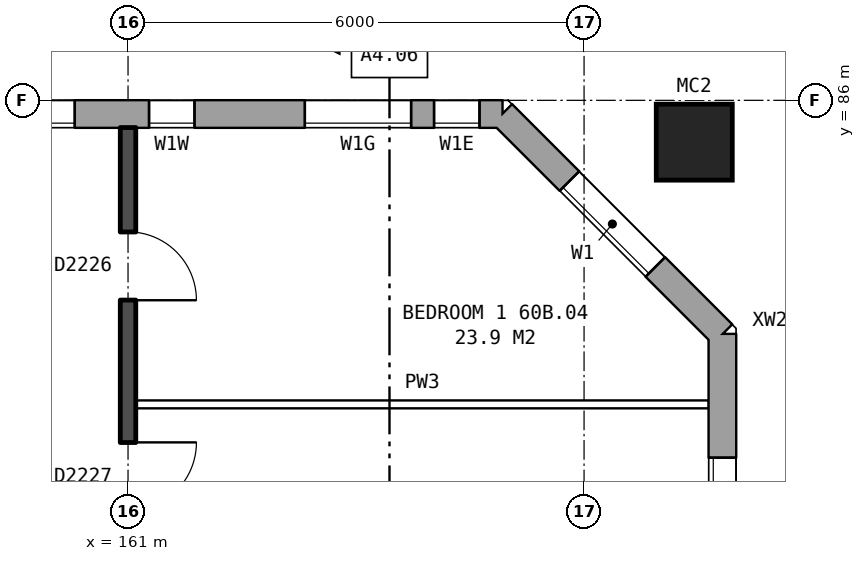
"""IFC4 building model, lengths in metres.
Left out: names, types, materials, properties, quantities, classifications, styles, units other than length and angle.
Written with IfcOpenShell. Run it as: python <this file> out.ifc"""

import sys

from ifc_helpers import new_model, si_unit, direction, frame, frame_2d, origin, origin_2d, place, context, subcontext, project, spatial, rectangle, hollow_rectangle, extrude, element, fill, save


model = new_model("IFC4")
c1 = context("Model", 3, precision=1e-05, world=origin(), true_north=direction((0.0, 1.0)))
c2 = subcontext(c1, "Body", "Model", "MODEL_VIEW")
j1 = project(units=[si_unit("LENGTHUNIT", "METRE"), si_unit("PLANEANGLEUNIT", "RADIAN")], contexts=[c1])
p1 = place(None, origin())
s1 = spatial("IfcSite", under=j1, at=p1, CompositionType="ELEMENT")
p2 = place(p1, origin())
s2 = spatial("IfcBuilding", under=s1, at=p2, CompositionType="ELEMENT")
p3 = place(p2, frame((0.0, 0.0, 212.1)))
s3 = spatial("IfcBuildingStorey", under=s2, at=p3, CompositionType="ELEMENT", Elevation=212.1)
p4 = place(p3, frame((168.45, 85.45, 0.0), z_axis=(0.0, 0.0, 1.0), x_axis=(1.0, 0.0, 0.0)))
e1 = element("IfcColumn", 1, at=p4, inside=s3, PredefinedType="COLUMN", context=c2, shape_type="SweptSolid", body=[
    extrude(hollow_rectangle(XDim=1.0, YDim=1.0, WallThickness=0.055, at=origin_2d()), origin(), (0.0, 0.0, 1.0), 3.1),
])
p5 = place(p3, frame((168.82, 57.075, 0.0), z_axis=(0.0, 0.0, 1.0), x_axis=(0.0, 1.0, 0.0)))
e2 = element("IfcWall", 2, at=p5, inside=s3, PredefinedType="STANDARD", context=c2, shape_type="SweptSolid", body=[
    extrude(rectangle(XDim=25.851, YDim=0.36, at=frame_2d((12.925, 0.0))), origin(), (0.0, 0.0, 1.0), 2.85),
])
p6 = place(p5, frame((1.625, 0.0, 0.8)))
e3 = element("IfcOpeningElement", 3, at=p6, cuts=e2, PredefinedType="OPENING", context=c2, shape_type="SweptSolid", body=[
    extrude(rectangle(XDim=1.6, YDim=1.8, at=frame_2d((0.8, 0.9))), frame((0.0, 0.19, 0.0), z_axis=(0.0, -1.0, 0.0), x_axis=(1.0, 0.0, 0.0)), (0.0, 0.0, 1.0), 0.38),
])
p7 = place(p5, frame((4.625, 0.0, 0.8)))
e4 = element("IfcOpeningElement", 4, at=p7, cuts=e2, PredefinedType="OPENING", context=c2, shape_type="SweptSolid", body=[
    extrude(rectangle(XDim=1.6, YDim=1.8, at=frame_2d((0.8, 0.9))), frame((0.0, 0.19, 0.0), z_axis=(0.0, -1.0, 0.0), x_axis=(1.0, 0.0, 0.0)), (0.0, 0.0, 1.0), 0.38),
])
p8 = place(p5, frame((19.625, 0.0, 0.8)))
e5 = element("IfcOpeningElement", 5, at=p8, cuts=e2, PredefinedType="OPENING", context=c2, shape_type="SweptSolid", body=[
    extrude(rectangle(XDim=1.6, YDim=1.8, at=frame_2d((0.8, 0.9))), frame((0.0, 0.19, 0.0), z_axis=(0.0, -1.0, 0.0), x_axis=(1.0, 0.0, 0.0)), (0.0, 0.0, 1.0), 0.38),
])
p9 = place(p5, frame((22.625, 0.0, 0.8)))
e6 = element("IfcOpeningElement", 6, at=p9, cuts=e2, PredefinedType="OPENING", context=c2, shape_type="SweptSolid", body=[
    extrude(rectangle(XDim=1.6, YDim=1.8, at=frame_2d((0.8, 0.9))), frame((0.0, 0.19, 0.0), z_axis=(0.0, -1.0, 0.0), x_axis=(1.0, 0.0, 0.0)), (0.0, 0.0, 1.0), 0.38),
])
p10 = place(p3, frame((168.82, 82.925, 0.0), z_axis=(0.0, 0.0, 1.0), x_axis=(-0.707106781187, 0.707106781187, 0.0)))
e7 = element("IfcWall", 7, at=p10, inside=s3, PredefinedType="STANDARD", context=c2, shape_type="SweptSolid", body=[
    extrude(rectangle(XDim=4.094, YDim=0.36, at=frame_2d((2.047, 0.0))), origin(), (0.0, 0.0, 1.0), 2.85),
])
p11 = place(p10, frame((1.247, 0.0, 0.8)))
e8 = element("IfcOpeningElement", 8, at=p11, cuts=e7, PredefinedType="OPENING", context=c2, shape_type="SweptSolid", body=[
    extrude(rectangle(XDim=1.6, YDim=1.8, at=frame_2d((0.8, 0.9))), frame((0.0, 0.19, 0.0), z_axis=(0.0, -1.0, 0.0), x_axis=(1.0, 0.0, 0.0)), (0.0, 0.0, 1.0), 0.38),
])
p12 = place(p3, frame((165.925, 85.82, 0.0), z_axis=(0.0, 0.0, 1.0), x_axis=(-1.0, 0.0, 0.0)))
e9 = element("IfcWall", 9, at=p12, inside=s3, PredefinedType="STANDARD", context=c2, shape_type="SweptSolid", body=[
    extrude(rectangle(XDim=33.875, YDim=0.36, at=frame_2d((16.938, 0.0))), origin(), (0.0, 0.0, 1.0), 2.85),
])
p13 = place(p12, frame((0.3, 0.0, 0.8)))
e10 = element("IfcOpeningElement", 10, at=p13, cuts=e9, PredefinedType="OPENING", context=c2, shape_type="SweptSolid", body=[
    extrude(rectangle(XDim=0.6, YDim=1.8, at=frame_2d((0.3, 0.9))), frame((0.0, 0.19, 0.0), z_axis=(0.0, -1.0, 0.0), x_axis=(1.0, 0.0, 0.0)), (0.0, 0.0, 1.0), 0.38),
])
p14 = place(p12, frame((5.625, 0.0, 0.8)))
e11 = element("IfcOpeningElement", 11, at=p14, cuts=e9, PredefinedType="OPENING", context=c2, shape_type="SweptSolid", body=[
    extrude(rectangle(XDim=1.6, YDim=1.8, at=frame_2d((0.8, 0.9))), frame((0.0, 0.19, 0.0), z_axis=(0.0, -1.0, 0.0), x_axis=(1.0, 0.0, 0.0)), (0.0, 0.0, 1.0), 0.38),
])
p15 = place(p12, frame((8.625, 0.0, 0.8)))
e12 = element("IfcOpeningElement", 12, at=p15, cuts=e9, PredefinedType="OPENING", context=c2, shape_type="SweptSolid", body=[
    extrude(rectangle(XDim=1.6, YDim=1.8, at=frame_2d((0.8, 0.9))), frame((0.0, 0.19, 0.0), z_axis=(0.0, -1.0, 0.0), x_axis=(1.0, 0.0, 0.0)), (0.0, 0.0, 1.0), 0.38),
])
p16 = place(p12, frame((11.625, 0.0, 0.8)))
e13 = element("IfcOpeningElement", 13, at=p16, cuts=e9, PredefinedType="OPENING", context=c2, shape_type="SweptSolid", body=[
    extrude(rectangle(XDim=1.6, YDim=1.8, at=frame_2d((0.8, 0.9))), frame((0.0, 0.19, 0.0), z_axis=(0.0, -1.0, 0.0), x_axis=(1.0, 0.0, 0.0)), (0.0, 0.0, 1.0), 0.38),
])
p17 = place(p12, frame((14.625, 0.0, 0.8)))
e14 = element("IfcOpeningElement", 14, at=p17, cuts=e9, PredefinedType="OPENING", context=c2, shape_type="SweptSolid", body=[
    extrude(rectangle(XDim=1.6, YDim=1.8, at=frame_2d((0.8, 0.9))), frame((0.0, 0.19, 0.0), z_axis=(0.0, -1.0, 0.0), x_axis=(1.0, 0.0, 0.0)), (0.0, 0.0, 1.0), 0.38),
])
p18 = place(p12, frame((17.625, 0.0, 0.8)))
e15 = element("IfcOpeningElement", 15, at=p18, cuts=e9, PredefinedType="OPENING", context=c2, shape_type="SweptSolid", body=[
    extrude(rectangle(XDim=1.6, YDim=1.8, at=frame_2d((0.8, 0.9))), frame((0.0, 0.19, 0.0), z_axis=(0.0, -1.0, 0.0), x_axis=(1.0, 0.0, 0.0)), (0.0, 0.0, 1.0), 0.38),
])
p19 = place(p12, frame((20.625, 0.0, 0.8)))
e16 = element("IfcOpeningElement", 16, at=p19, cuts=e9, PredefinedType="OPENING", context=c2, shape_type="SweptSolid", body=[
    extrude(rectangle(XDim=1.6, YDim=1.8, at=frame_2d((0.8, 0.9))), frame((0.0, 0.19, 0.0), z_axis=(0.0, -1.0, 0.0), x_axis=(1.0, 0.0, 0.0)), (0.0, 0.0, 1.0), 0.38),
])
p20 = place(p12, frame((23.625, 0.0, 0.8)))
e17 = element("IfcOpeningElement", 17, at=p20, cuts=e9, PredefinedType="OPENING", context=c2, shape_type="SweptSolid", body=[
    extrude(rectangle(XDim=1.6, YDim=1.8, at=frame_2d((0.8, 0.9))), frame((0.0, 0.19, 0.0), z_axis=(0.0, -1.0, 0.0), x_axis=(1.0, 0.0, 0.0)), (0.0, 0.0, 1.0), 0.38),
])
p21 = place(p12, frame((25.525, 0.0, 0.8)))
e18 = element("IfcOpeningElement", 18, at=p21, cuts=e9, PredefinedType="OPENING", context=c2, shape_type="SweptSolid", body=[
    extrude(rectangle(XDim=1.6, YDim=1.8, at=frame_2d((0.8, 0.9))), frame((0.0, 0.19, 0.0), z_axis=(0.0, -1.0, 0.0), x_axis=(1.0, 0.0, 0.0)), (0.0, 0.0, 1.0), 0.38),
])
p22 = place(p12, frame((29.625, 0.0, 0.8)))
e19 = element("IfcOpeningElement", 19, at=p22, cuts=e9, PredefinedType="OPENING", context=c2, shape_type="SweptSolid", body=[
    extrude(rectangle(XDim=1.6, YDim=1.8, at=frame_2d((0.8, 0.9))), frame((0.0, 0.19, 0.0), z_axis=(0.0, -1.0, 0.0), x_axis=(1.0, 0.0, 0.0)), (0.0, 0.0, 1.0), 0.38),
])
p23 = place(p12, frame((1.2, 0.0, 1.1)))
e20 = element("IfcOpeningElement", 20, at=p23, cuts=e9, PredefinedType="OPENING", context=c2, shape_type="SweptSolid", body=[
    extrude(rectangle(XDim=1.4, YDim=1.5, at=frame_2d((0.7, 0.75))), frame((0.0, 0.19, 0.0), z_axis=(0.0, -1.0, 0.0), x_axis=(1.0, 0.0, 0.0)), (0.0, 0.0, 1.0), 0.38),
])
p24 = place(p12, frame((4.05, 0.0, 0.8)))
e21 = element("IfcOpeningElement", 21, at=p24, cuts=e9, PredefinedType="OPENING", context=c2, shape_type="SweptSolid", body=[
    extrude(rectangle(XDim=0.6, YDim=0.9, at=frame_2d((0.3, 0.45))), frame((0.0, 0.19, 0.0), z_axis=(0.0, -1.0, 0.0), x_axis=(1.0, 0.0, 0.0)), (0.0, 0.0, 1.0), 0.38),
])
p25 = place(p3, frame((161.1, 82.0, 0.0), z_axis=(0.0, 0.0, 1.0), x_axis=(1.0, 0.0, 0.0)))
e22 = element("IfcWall", 22, at=p25, inside=s3, PredefinedType="PARTITIONING", context=c2, shape_type="SweptSolid", body=[
    extrude(rectangle(XDim=7.54, YDim=0.1, at=frame_2d((3.77, 0.0))), origin(), (0.0, 0.0, 1.0), 2.85),
])
p26 = place(p3, frame((161.0, 76.2, 0.0), z_axis=(0.0, 0.0, 1.0), x_axis=(0.0, 1.0, 0.0)))
e23 = element("IfcWall", 23, at=p26, inside=s3, PredefinedType="SOLIDWALL", context=c2, shape_type="SweptSolid", body=[
    extrude(rectangle(XDim=9.44, YDim=0.2, at=frame_2d((4.72, 0.0))), origin(), (0.0, 0.0, 1.0), 2.85),
])
p27 = place(p26, frame((7.17, 0.0, 0.0)))
e24 = element("IfcOpeningElement", 24, at=p27, cuts=e23, PredefinedType="OPENING", context=c2, shape_type="SweptSolid", body=[
    extrude(rectangle(XDim=0.9, YDim=2.1, at=frame_2d((0.45, 1.05))), frame((0.0, 0.11, 0.0), z_axis=(0.0, -1.0, 0.0), x_axis=(1.0, 0.0, 0.0)), (0.0, 0.0, 1.0), 0.22),
])
p28 = place(p26, frame((4.4, 0.0, 0.0)))
e25 = element("IfcOpeningElement", 25, at=p28, cuts=e23, PredefinedType="OPENING", context=c2, shape_type="SweptSolid", body=[
    extrude(rectangle(XDim=0.9, YDim=2.1, at=frame_2d((0.45, 1.05))), frame((0.0, 0.11, 0.0), z_axis=(0.0, -1.0, 0.0), x_axis=(1.0, 0.0, 0.0)), (0.0, 0.0, 1.0), 0.22),
])
p29 = place(p26, frame((0.95, 0.0, 0.0)))
e26 = element("IfcOpeningElement", 26, at=p29, cuts=e23, PredefinedType="OPENING", context=c2, shape_type="SweptSolid", body=[
    extrude(rectangle(XDim=0.9, YDim=2.1, at=frame_2d((0.45, 1.05))), frame((0.0, 0.11, 0.0), z_axis=(0.0, -1.0, 0.0), x_axis=(1.0, 0.0, 0.0)), (0.0, 0.0, 1.0), 0.22),
])
p30 = place(p9, origin())
e27 = element("IfcWindow", 27, at=p30, inside=s3, PartitioningType="SINGLE_PANEL", PredefinedType="WINDOW", context=c2, shape_type="SweptSolid", body=[
    extrude(rectangle(XDim=1.6, YDim=1.8, at=frame_2d((0.8, 0.9))), frame((0.0, 0.15, 0.0), z_axis=(0.0, -1.0, 0.0), x_axis=(1.0, 0.0, 0.0)), (0.0, 0.0, 1.0), 0.06),
])
fill(e6, e27)
p31 = place(p11, origin())
e28 = element("IfcWindow", 28, at=p31, inside=s3, PartitioningType="SINGLE_PANEL", PredefinedType="WINDOW", context=c2, shape_type="SweptSolid", body=[
    extrude(rectangle(XDim=1.6, YDim=1.8, at=frame_2d((0.8, 0.9))), frame((0.0, 0.15, 0.0), z_axis=(0.0, -1.0, 0.0), x_axis=(1.0, 0.0, 0.0)), (0.0, 0.0, 1.0), 0.06),
])
fill(e8, e28)
p32 = place(p13, origin())
e29 = element("IfcWindow", 29, at=p32, inside=s3, PartitioningType="SINGLE_PANEL", PredefinedType="WINDOW", context=c2, shape_type="SweptSolid", body=[
    extrude(rectangle(XDim=0.6, YDim=1.8, at=frame_2d((0.3, 0.9))), frame((0.0, 0.15, 0.0), z_axis=(0.0, -1.0, 0.0), x_axis=(1.0, 0.0, 0.0)), (0.0, 0.0, 1.0), 0.06),
])
fill(e10, e29)
p33 = place(p14, origin())
e30 = element("IfcWindow", 30, at=p33, inside=s3, PartitioningType="SINGLE_PANEL", PredefinedType="WINDOW", context=c2, shape_type="SweptSolid", body=[
    extrude(rectangle(XDim=1.6, YDim=1.8, at=frame_2d((0.8, 0.9))), frame((0.0, 0.15, 0.0), z_axis=(0.0, -1.0, 0.0), x_axis=(1.0, 0.0, 0.0)), (0.0, 0.0, 1.0), 0.06),
])
fill(e11, e30)
p34 = place(p27, frame((0.9, 0.0, 0.0), z_axis=(0.0, 0.0, 1.0), x_axis=(-1.0, 0.0, 0.0)))
e31 = element("IfcDoor", 31, at=p34, inside=s3, OperationType="SINGLE_SWING_RIGHT", PredefinedType="DOOR", context=c2, shape_type="SweptSolid", body=[
    extrude(rectangle(XDim=0.9, YDim=2.1, at=frame_2d((0.45, 1.05))), frame((0.0, 0.025, 0.0), z_axis=(0.0, -1.0, 0.0), x_axis=(1.0, 0.0, 0.0)), (0.0, 0.0, 1.0), 0.05),
])
fill(e24, e31)
p35 = place(p28, frame((0.9, 0.0, 0.0), z_axis=(0.0, 0.0, 1.0), x_axis=(-1.0, 0.0, 0.0)))
e32 = element("IfcDoor", 32, at=p35, inside=s3, OperationType="SINGLE_SWING_LEFT", PredefinedType="DOOR", context=c2, shape_type="SweptSolid", body=[
    extrude(rectangle(XDim=0.9, YDim=2.1, at=frame_2d((0.45, 1.05))), frame((0.0, 0.025, 0.0), z_axis=(0.0, -1.0, 0.0), x_axis=(1.0, 0.0, 0.0)), (0.0, 0.0, 1.0), 0.05),
])
fill(e25, e32)
p36 = place(p23, origin())
e33 = element("IfcWindow", 33, at=p36, inside=s3, PartitioningType="SINGLE_PANEL", PredefinedType="WINDOW", context=c2, shape_type="SweptSolid", body=[
    extrude(rectangle(XDim=1.4, YDim=1.5, at=frame_2d((0.7, 0.75))), frame((0.0, 0.15, 0.0), z_axis=(0.0, -1.0, 0.0), x_axis=(1.0, 0.0, 0.0)), (0.0, 0.0, 1.0), 0.06),
])
fill(e20, e33)
p37 = place(p24, origin())
e34 = element("IfcWindow", 34, at=p37, inside=s3, PartitioningType="SINGLE_PANEL", PredefinedType="WINDOW", context=c2, shape_type="SweptSolid", body=[
    extrude(rectangle(XDim=0.6, YDim=0.9, at=frame_2d((0.3, 0.45))), frame((0.0, 0.15, 0.0), z_axis=(0.0, -1.0, 0.0), x_axis=(1.0, 0.0, 0.0)), (0.0, 0.0, 1.0), 0.06),
])
fill(e21, e34)
save(model, sys.argv[1])
